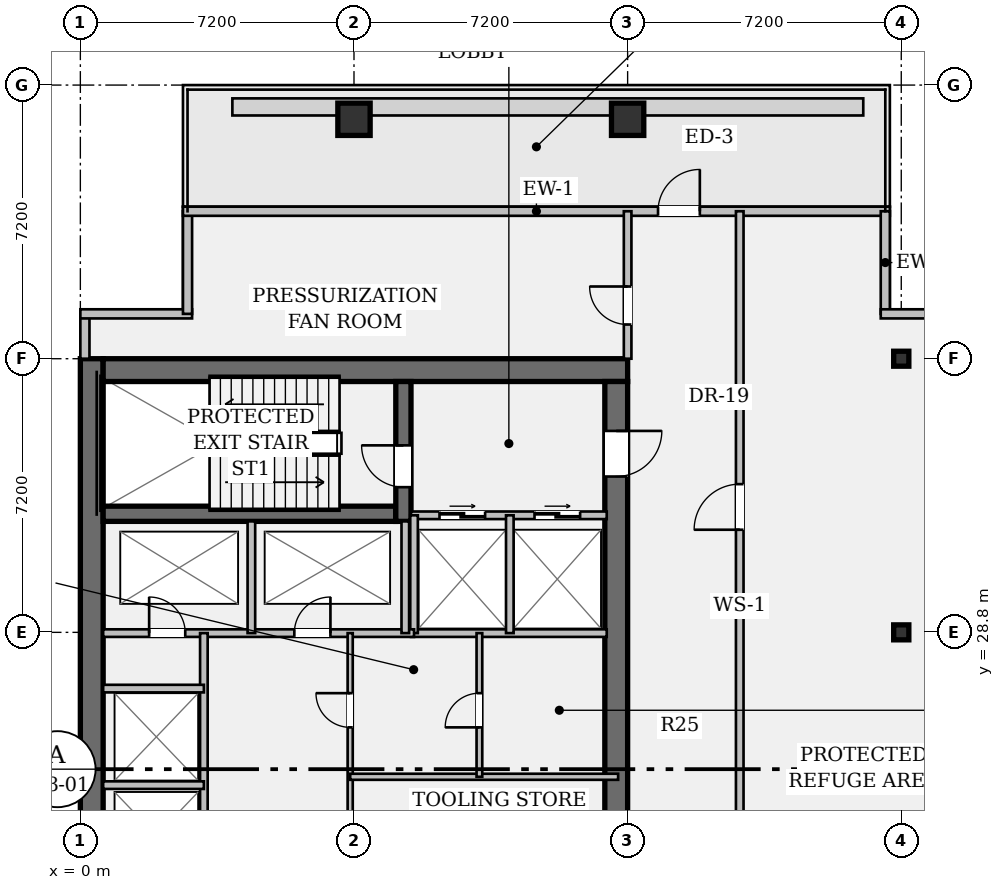
"""IFC4 building model, lengths in metres.
Left out: names, types, materials, properties, quantities, classifications, styles, units other than length and angle.
Written with IfcOpenShell. Run it as: python <this file> out.ifc"""

import sys

from ifc_helpers import new_model, si_unit, direction, frame, frame_2d, origin, origin_2d, place, context, subcontext, project, spatial, rectangle, hollow_rectangle, i_section, extrude, element, fill, save


model = new_model("IFC4")
c1 = context("Model", 3, precision=1e-05, world=origin(), true_north=direction((0.0, 1.0)))
c2 = subcontext(c1, "Body", "Model", "MODEL_VIEW")
j1 = project(units=[si_unit("LENGTHUNIT", "METRE"), si_unit("PLANEANGLEUNIT", "RADIAN")], contexts=[c1])
p1 = place(None, origin())
s1 = spatial("IfcSite", under=j1, at=p1, CompositionType="ELEMENT")
p2 = place(p1, origin())
s2 = spatial("IfcBuilding", under=s1, at=p2, CompositionType="ELEMENT")
p3 = place(p2, frame((0.0, 0.0, 163.8)))
s3 = spatial("IfcBuildingStorey", under=s2, at=p3, CompositionType="ELEMENT", Elevation=163.8)
p4 = place(p3, frame((0.3, 7.2, 0.0), z_axis=(0.0, 0.0, 1.0), x_axis=(0.0, 1.0, 0.0)))
e1 = element("IfcWall", 1, at=p4, inside=s3, PredefinedType="SHEAR", context=c2, shape_type="SweptSolid", body=[
    extrude(rectangle(XDim=28.8, YDim=0.6, at=frame_2d((14.4, 0.0))), origin(), (0.0, 0.0, 1.0), 4.6),
])
p5 = place(p3, frame((0.6, 35.7, 0.0), z_axis=(0.0, 0.0, 1.0), x_axis=(1.0, 0.0, 0.0)))
e2 = element("IfcWall", 2, at=p5, inside=s3, PredefinedType="SHEAR", context=c2, shape_type="SweptSolid", body=[
    extrude(rectangle(XDim=13.8, YDim=0.6, at=frame_2d((6.9, 0.0))), origin(), (0.0, 0.0, 1.0), 4.6),
])
p6 = place(p3, frame((14.1, 35.4, 0.0), z_axis=(0.0, 0.0, 1.0), x_axis=(0.0, -1.0, 0.0)))
e3 = element("IfcWall", 3, at=p6, inside=s3, PredefinedType="SHEAR", context=c2, shape_type="SweptSolid", body=[
    extrude(rectangle(XDim=27.6, YDim=0.6, at=frame_2d((13.8, 0.0))), origin(), (0.0, 0.0, 1.0), 4.6),
])
p7 = place(p6, frame((1.3, 0.0, 0.0)))
e4 = element("IfcOpeningElement", 4, at=p7, cuts=e3, PredefinedType="OPENING", context=c2, shape_type="SweptSolid", body=[
    extrude(rectangle(XDim=1.2, YDim=2.15, at=frame_2d((0.6, 1.075))), frame((0.0, 0.312, 0.0), z_axis=(0.0, -1.0, 0.0), x_axis=(1.0, 0.0, 0.0)), (0.0, 0.0, 1.0), 0.624),
])
p8 = place(p6, frame((25.25, 0.0, 0.0)))
e5 = element("IfcOpeningElement", 5, at=p8, cuts=e3, PredefinedType="OPENING", context=c2, shape_type="SweptSolid", body=[
    extrude(rectangle(XDim=1.2, YDim=2.15, at=frame_2d((0.6, 1.075))), frame((0.0, 0.312, 0.0), z_axis=(0.0, -1.0, 0.0), x_axis=(1.0, 0.0, 0.0)), (0.0, 0.0, 1.0), 0.624),
])
p9 = place(p6, frame((14.6, 0.0, 0.0)))
e6 = element("IfcOpeningElement", 6, at=p9, cuts=e3, PredefinedType="OPENING", context=c2, shape_type="SweptSolid", body=[
    extrude(rectangle(XDim=1.6, YDim=2.2, at=frame_2d((0.8, 1.1))), frame((0.0, 0.312, 0.0), z_axis=(0.0, -1.0, 0.0), x_axis=(1.0, 0.0, 0.0)), (0.0, 0.0, 1.0), 0.624),
])
p10 = place(p3, frame((0.6, 31.92, 0.0), z_axis=(0.0, 0.0, 1.0), x_axis=(1.0, 0.0, 0.0)))
e7 = element("IfcWall", 7, at=p10, inside=s3, PredefinedType="SHEAR", context=c2, shape_type="SweptSolid", body=[
    extrude(rectangle(XDim=7.7, YDim=0.4, at=frame_2d((3.85, 0.0))), origin(), (0.0, 0.0, 1.0), 4.6),
])
p11 = place(p3, frame((8.5, 31.72, 0.0), z_axis=(0.0, 0.0, 1.0), x_axis=(0.0, 1.0, 0.0)))
e8 = element("IfcWall", 8, at=p11, inside=s3, PredefinedType="SHEAR", context=c2, shape_type="SweptSolid", body=[
    extrude(rectangle(XDim=3.68, YDim=0.4, at=frame_2d((1.84, 0.0))), origin(), (0.0, 0.0, 1.0), 4.6),
])
p12 = place(p11, frame((0.9, 0.0, 0.0)))
e9 = element("IfcOpeningElement", 9, at=p12, cuts=e8, PredefinedType="OPENING", context=c2, shape_type="SweptSolid", body=[
    extrude(rectangle(XDim=1.1, YDim=2.15, at=frame_2d((0.55, 1.075))), frame((0.0, 0.212, 0.0), z_axis=(0.0, -1.0, 0.0), x_axis=(1.0, 0.0, 0.0)), (0.0, 0.0, 1.0), 0.424),
])
for number, where, z_axis, x_axis in (
    (10, (7.2, 42.3, 0.0), (0.0, 0.0, 1.0), (1.0, 0.0, 0.0)),
    (11, (14.4, 42.3, 0.0), (0.0, 0.0, 1.0), (1.0, 0.0, 0.0)),
):
    element("IfcColumn", number, at=place(p3, frame(where, z_axis=z_axis, x_axis=x_axis)), inside=s3, PredefinedType="COLUMN", context=c2, shape_type="SweptSolid", body=[
        extrude(hollow_rectangle(XDim=0.85, YDim=0.85, WallThickness=0.05, at=origin_2d()), origin(), (0.0, 0.0, 1.0), 4.6),
    ])
for number, where, z_axis, x_axis in (
    (12, (21.6, 28.8, 0.0), (0.0, 0.0, 1.0), (1.0, 0.0, 0.0)),
    (13, (21.6, 36.0, 0.0), (0.0, 0.0, 1.0), (1.0, 0.0, 0.0)),
):
    element("IfcColumn", number, at=place(p3, frame(where, z_axis=z_axis, x_axis=x_axis)), inside=s3, PredefinedType="COLUMN", context=c2, shape_type="SweptSolid", body=[
        extrude(i_section(OverallWidth=0.399, OverallDepth=0.394, WebThickness=0.023, FlangeThickness=0.037, FilletRadius=0.018, at=origin_2d()), origin(), (0.0, 0.0, 1.0), 4.6),
    ])
p13 = place(p3, frame((0.12, 36.0, 0.0), z_axis=(0.0, 0.0, 1.0), x_axis=(0.0, 1.0, 0.0)))
e14 = element("IfcWall", 14, at=p13, inside=s3, PredefinedType="STANDARD", context=c2, shape_type="SweptSolid", body=[
    extrude(rectangle(XDim=1.18, YDim=0.24, at=frame_2d((0.59, 0.0))), origin(), (0.0, 0.0, 1.0), 4.6),
])
p14 = place(p3, frame((0.0, 37.18, 0.0), z_axis=(0.0, 0.0, 1.0), x_axis=(1.0, 0.0, 0.0)))
e15 = element("IfcWall", 15, at=p14, inside=s3, PredefinedType="STANDARD", context=c2, shape_type="SweptSolid", body=[
    extrude(rectangle(XDim=2.94, YDim=0.24, at=frame_2d((1.47, 0.0))), origin(), (0.0, 0.0, 1.0), 4.6),
])
p15 = place(p3, frame((2.82, 37.18, 0.0), z_axis=(0.0, 0.0, 1.0), x_axis=(0.0, 1.0, 0.0)))
e16 = element("IfcWall", 16, at=p15, inside=s3, PredefinedType="STANDARD", context=c2, shape_type="SweptSolid", body=[
    extrude(rectangle(XDim=2.7, YDim=0.24, at=frame_2d((1.35, 0.0))), origin(), (0.0, 0.0, 1.0), 4.6),
])
p16 = place(p3, frame((2.7, 39.88, 0.0), z_axis=(0.0, 0.0, 1.0), x_axis=(1.0, 0.0, 0.0)))
e17 = element("IfcWall", 17, at=p16, inside=s3, PredefinedType="STANDARD", context=c2, shape_type="SweptSolid", body=[
    extrude(rectangle(XDim=18.6, YDim=0.24, at=frame_2d((9.3, 0.0))), origin(), (0.0, 0.0, 1.0), 3.185),
])
p17 = place(p16, frame((12.5, 0.0, 0.0)))
e18 = element("IfcOpeningElement", 18, at=p17, cuts=e17, PredefinedType="OPENING", context=c2, shape_type="SweptSolid", body=[
    extrude(rectangle(XDim=1.1, YDim=2.15, at=frame_2d((0.55, 1.075))), frame((0.0, 0.132, 0.0), z_axis=(0.0, -1.0, 0.0), x_axis=(1.0, 0.0, 0.0)), (0.0, 0.0, 1.0), 0.264),
])
p18 = place(p3, frame((21.18, 39.88, 0.0), z_axis=(0.0, 0.0, 1.0), x_axis=(0.0, -1.0, 0.0)))
e19 = element("IfcWall", 19, at=p18, inside=s3, PredefinedType="STANDARD", context=c2, shape_type="SweptSolid", body=[
    extrude(rectangle(XDim=2.7, YDim=0.24, at=frame_2d((1.35, 0.0))), origin(), (0.0, 0.0, 1.0), 4.6),
])
p19 = place(p3, frame((21.06, 37.18, 0.0), z_axis=(0.0, 0.0, 1.0), x_axis=(1.0, 0.0, 0.0)))
e20 = element("IfcWall", 20, at=p19, inside=s3, PredefinedType="STANDARD", context=c2, shape_type="SweptSolid", body=[
    extrude(rectangle(XDim=2.94, YDim=0.24, at=frame_2d((1.47, 0.0))), origin(), (0.0, 0.0, 1.0), 4.6),
])
p20 = place(p3, frame((8.7, 31.88, 0.0), z_axis=(0.0, 0.0, 1.0), x_axis=(1.0, 0.0, 0.0)))
e21 = element("IfcWall", 21, at=p20, inside=s3, PredefinedType="PARTITIONING", context=c2, shape_type="SweptSolid", body=[
    extrude(rectangle(XDim=5.15, YDim=0.2, at=frame_2d((2.575, 0.0))), origin(), (0.0, 0.0, 1.0), 4.6),
])
p21 = place(p20, frame((0.75, 0.0, 0.0)))
e22 = element("IfcOpeningElement", 22, at=p21, cuts=e21, PredefinedType="OPENING", context=c2, shape_type="SweptSolid", body=[
    extrude(rectangle(XDim=1.2, YDim=2.2, at=frame_2d((0.6, 1.1))), frame((0.0, 0.112, 0.0), z_axis=(0.0, -1.0, 0.0), x_axis=(1.0, 0.0, 0.0)), (0.0, 0.0, 1.0), 0.224),
])
p22 = place(p20, frame((3.25, 0.0, 0.0)))
e23 = element("IfcOpeningElement", 23, at=p22, cuts=e21, PredefinedType="OPENING", context=c2, shape_type="SweptSolid", body=[
    extrude(rectangle(XDim=1.2, YDim=2.2, at=frame_2d((0.6, 1.1))), frame((0.0, 0.112, 0.0), z_axis=(0.0, -1.0, 0.0), x_axis=(1.0, 0.0, 0.0)), (0.0, 0.0, 1.0), 0.224),
])
p23 = place(p3, frame((8.7, 28.78, 0.0), z_axis=(0.0, 0.0, 1.0), x_axis=(1.0, 0.0, 0.0)))
e24 = element("IfcWall", 24, at=p23, inside=s3, PredefinedType="PARTITIONING", context=c2, shape_type="SweptSolid", body=[
    extrude(rectangle(XDim=5.15, YDim=0.2, at=frame_2d((2.575, 0.0))), origin(), (0.0, 0.0, 1.0), 4.6),
])
for number, where, z_axis, x_axis in (
    (25, (8.78, 28.78, 0.0), (0.0, 0.0, 1.0), (0.0, 1.0, 0.0)),
    (26, (11.3, 28.78, 0.0), (0.0, 0.0, 1.0), (0.0, 1.0, 0.0)),
):
    element("IfcWall", number, at=place(p3, frame(where, z_axis=z_axis, x_axis=x_axis)), inside=s3, PredefinedType="PARTITIONING", context=c2, shape_type="SweptSolid", body=[
        extrude(rectangle(XDim=3.1, YDim=0.2, at=frame_2d((1.55, 0.0))), origin(), (0.0, 0.0, 1.0), 4.6),
    ])
p24 = place(p3, frame((0.6, 28.78, 0.0), z_axis=(0.0, 0.0, 1.0), x_axis=(1.0, 0.0, 0.0)))
e27 = element("IfcWall", 27, at=p24, inside=s3, PredefinedType="PARTITIONING", context=c2, shape_type="SweptSolid", body=[
    extrude(rectangle(XDim=8.18, YDim=0.2, at=frame_2d((4.09, 0.0))), origin(), (0.0, 0.0, 1.0), 4.6),
])
p25 = place(p24, frame((1.21, 0.0, 0.0)))
e28 = element("IfcOpeningElement", 28, at=p25, cuts=e27, PredefinedType="OPENING", context=c2, shape_type="SweptSolid", body=[
    extrude(rectangle(XDim=0.95, YDim=2.15, at=frame_2d((0.475, 1.075))), frame((0.0, 0.112, 0.0), z_axis=(0.0, -1.0, 0.0), x_axis=(1.0, 0.0, 0.0)), (0.0, 0.0, 1.0), 0.224),
])
p26 = place(p24, frame((5.03, 0.0, 0.0)))
e29 = element("IfcOpeningElement", 29, at=p26, cuts=e27, PredefinedType="OPENING", context=c2, shape_type="SweptSolid", body=[
    extrude(rectangle(XDim=0.95, YDim=2.15, at=frame_2d((0.475, 1.075))), frame((0.0, 0.112, 0.0), z_axis=(0.0, -1.0, 0.0), x_axis=(1.0, 0.0, 0.0)), (0.0, 0.0, 1.0), 0.224),
])
for number, where, z_axis, x_axis in (
    (30, (4.5, 28.78, 0.0), (0.0, 0.0, 1.0), (0.0, 1.0, 0.0)),
    (31, (8.55, 28.78, 0.0), (0.0, 0.0, 1.0), (0.0, 1.0, 0.0)),
):
    element("IfcWall", number, at=place(p3, frame(where, z_axis=z_axis, x_axis=x_axis)), inside=s3, PredefinedType="PARTITIONING", context=c2, shape_type="SweptSolid", body=[
        extrude(rectangle(XDim=2.94, YDim=0.2, at=frame_2d((1.47, 0.0))), origin(), (0.0, 0.0, 1.0), 4.6),
    ])
p27 = place(p3, frame((3.25, 15.7, 0.0), z_axis=(0.0, 0.0, 1.0), x_axis=(0.0, 1.0, 0.0)))
e32 = element("IfcWall", 32, at=p27, inside=s3, PredefinedType="PARTITIONING", context=c2, shape_type="SweptSolid", body=[
    extrude(rectangle(XDim=13.08, YDim=0.2, at=frame_2d((6.54, 0.0))), origin(), (0.0, 0.0, 1.0), 4.6),
])
for number, where, z_axis, x_axis in (
    (33, (0.6, 24.78, 0.0), (0.0, 0.0, 1.0), (1.0, 0.0, 0.0)),
    (34, (0.6, 27.32, 0.0), (0.0, 0.0, 1.0), (1.0, 0.0, 0.0)),
):
    element("IfcWall", number, at=place(p3, frame(where, z_axis=z_axis, x_axis=x_axis)), inside=s3, PredefinedType="PARTITIONING", context=c2, shape_type="SweptSolid", body=[
        extrude(rectangle(XDim=2.65, YDim=0.2, at=frame_2d((1.325, 0.0))), origin(), (0.0, 0.0, 1.0), 4.6),
    ])
p28 = place(p3, frame((7.1, 22.2, 0.0), z_axis=(0.0, 0.0, 1.0), x_axis=(0.0, 1.0, 0.0)))
e35 = element("IfcWall", 35, at=p28, inside=s3, PredefinedType="PARTITIONING", context=c2, shape_type="SweptSolid", body=[
    extrude(rectangle(XDim=6.58, YDim=0.135, at=frame_2d((3.29, 0.0))), origin(), (0.0, 0.0, 1.0), 4.6),
])
p29 = place(p28, frame((4.1, 0.0, 0.0)))
e36 = element("IfcOpeningElement", 36, at=p29, cuts=e35, PredefinedType="OPENING", context=c2, shape_type="SweptSolid", body=[
    extrude(rectangle(XDim=0.9, YDim=2.15, at=frame_2d((0.45, 1.075))), frame((0.0, 0.08, 0.0), z_axis=(0.0, -1.0, 0.0), x_axis=(1.0, 0.0, 0.0)), (0.0, 0.0, 1.0), 0.159),
])
p30 = place(p3, frame((7.1, 25.0, 0.0), z_axis=(0.0, 0.0, 1.0), x_axis=(1.0, 0.0, 0.0)))
e37 = element("IfcWall", 37, at=p30, inside=s3, PredefinedType="PARTITIONING", context=c2, shape_type="SweptSolid", body=[
    extrude(rectangle(XDim=7.05, YDim=0.16, at=frame_2d((3.525, 0.0))), origin(), (0.0, 0.0, 1.0), 4.6),
])
p31 = place(p3, frame((10.5, 25.0, 0.0), z_axis=(0.0, 0.0, 1.0), x_axis=(0.0, 1.0, 0.0)))
e38 = element("IfcWall", 38, at=p31, inside=s3, PredefinedType="PARTITIONING", context=c2, shape_type="SweptSolid", body=[
    extrude(rectangle(XDim=3.78, YDim=0.15, at=frame_2d((1.89, 0.0))), origin(), (0.0, 0.0, 1.0), 4.6),
])
p32 = place(p31, frame((1.3, 0.0, 0.0)))
e39 = element("IfcOpeningElement", 39, at=p32, cuts=e38, PredefinedType="OPENING", context=c2, shape_type="SweptSolid", body=[
    extrude(rectangle(XDim=0.9, YDim=2.15, at=frame_2d((0.45, 1.075))), frame((0.0, 0.087, 0.0), z_axis=(0.0, -1.0, 0.0), x_axis=(1.0, 0.0, 0.0)), (0.0, 0.0, 1.0), 0.174),
])
p33 = place(p3, frame((14.4, 36.0, 0.0), z_axis=(0.0, 0.0, 1.0), x_axis=(0.0, 1.0, 0.0)))
e40 = element("IfcWall", 40, at=p33, inside=s3, PredefinedType="PARTITIONING", context=c2, shape_type="SweptSolid", body=[
    extrude(rectangle(XDim=3.88, YDim=0.2, at=frame_2d((1.94, 0.0))), origin(), (0.0, 0.0, 1.0), 3.467),
])
p34 = place(p33, frame((0.9, 0.0, 0.0)))
e41 = element("IfcOpeningElement", 41, at=p34, cuts=e40, PredefinedType="OPENING", context=c2, shape_type="SweptSolid", body=[
    extrude(rectangle(XDim=1.0, YDim=2.15, at=frame_2d((0.5, 1.075))), frame((0.0, 0.112, 0.0), z_axis=(0.0, -1.0, 0.0), x_axis=(1.0, 0.0, 0.0)), (0.0, 0.0, 1.0), 0.224),
])
p35 = place(p3, frame((17.35, 20.3, 0.0), z_axis=(0.0, 0.0, 1.0), x_axis=(0.0, 1.0, 0.0)))
e42 = element("IfcWall", 42, at=p35, inside=s3, PredefinedType="PARTITIONING", context=c2, shape_type="SweptSolid", body=[
    extrude(rectangle(XDim=19.58, YDim=0.2, at=frame_2d((9.79, 0.0))), origin(), (0.0, 0.0, 1.0), 3.963),
])
p36 = place(p35, frame((11.2, 0.0, 0.0)))
e43 = element("IfcOpeningElement", 43, at=p36, cuts=e42, PredefinedType="OPENING", context=c2, shape_type="SweptSolid", body=[
    extrude(rectangle(XDim=1.2, YDim=2.15, at=frame_2d((0.6, 1.075))), frame((0.0, 0.112, 0.0), z_axis=(0.0, -1.0, 0.0), x_axis=(1.0, 0.0, 0.0)), (0.0, 0.0, 1.0), 0.224),
])
p37 = place(p17, origin())
e44 = element("IfcDoor", 44, at=p37, inside=s3, OperationType="SINGLE_SWING_RIGHT", PredefinedType="DOOR", context=c2, shape_type="SweptSolid", body=[
    extrude(rectangle(XDim=1.1, YDim=2.15, at=frame_2d((0.55, 1.075))), frame((0.0, 0.025, 0.0), z_axis=(0.0, -1.0, 0.0), x_axis=(1.0, 0.0, 0.0)), (0.0, 0.0, 1.0), 0.05),
])
fill(e18, e44)
p38 = place(p12, origin())
e45 = element("IfcDoor", 45, at=p38, inside=s3, OperationType="SINGLE_SWING_RIGHT", PredefinedType="DOOR", context=c2, shape_type="SweptSolid", body=[
    extrude(rectangle(XDim=1.1, YDim=2.15, at=frame_2d((0.55, 1.075))), frame((0.0, 0.025, 0.0), z_axis=(0.0, -1.0, 0.0), x_axis=(1.0, 0.0, 0.0)), (0.0, 0.0, 1.0), 0.05),
])
fill(e9, e45)
p39 = place(p7, origin())
e46 = element("IfcDoor", 46, at=p39, inside=s3, OperationType="SINGLE_SWING_LEFT", PredefinedType="DOOR", context=c2, shape_type="SweptSolid", body=[
    extrude(rectangle(XDim=1.2, YDim=2.15, at=frame_2d((0.6, 1.075))), frame((0.0, 0.025, 0.0), z_axis=(0.0, -1.0, 0.0), x_axis=(1.0, 0.0, 0.0)), (0.0, 0.0, 1.0), 0.05),
])
fill(e4, e46)
p40 = place(p21, origin())
e47 = element("IfcDoor", 47, at=p40, inside=s3, OperationType="DOUBLE_DOOR_SLIDING", PredefinedType="DOOR", context=c2, shape_type="SweptSolid", body=[
    extrude(rectangle(XDim=1.2, YDim=2.2, at=frame_2d((0.6, 1.1))), frame((0.0, 0.025, 0.0), z_axis=(0.0, -1.0, 0.0), x_axis=(1.0, 0.0, 0.0)), (0.0, 0.0, 1.0), 0.05),
])
fill(e22, e47)
p41 = place(p22, origin())
e48 = element("IfcDoor", 48, at=p41, inside=s3, OperationType="DOUBLE_DOOR_SLIDING", PredefinedType="DOOR", context=c2, shape_type="SweptSolid", body=[
    extrude(rectangle(XDim=1.2, YDim=2.2, at=frame_2d((0.6, 1.1))), frame((0.0, 0.025, 0.0), z_axis=(0.0, -1.0, 0.0), x_axis=(1.0, 0.0, 0.0)), (0.0, 0.0, 1.0), 0.05),
])
fill(e23, e48)
p42 = place(p25, origin())
e49 = element("IfcDoor", 49, at=p42, inside=s3, OperationType="SINGLE_SWING_LEFT", PredefinedType="DOOR", context=c2, shape_type="SweptSolid", body=[
    extrude(rectangle(XDim=0.95, YDim=2.15, at=frame_2d((0.475, 1.075))), frame((0.0, 0.025, 0.0), z_axis=(0.0, -1.0, 0.0), x_axis=(1.0, 0.0, 0.0)), (0.0, 0.0, 1.0), 0.05),
])
fill(e28, e49)
p43 = place(p26, origin())
e50 = element("IfcDoor", 50, at=p43, inside=s3, OperationType="SINGLE_SWING_RIGHT", PredefinedType="DOOR", context=c2, shape_type="SweptSolid", body=[
    extrude(rectangle(XDim=0.95, YDim=2.15, at=frame_2d((0.475, 1.075))), frame((0.0, 0.025, 0.0), z_axis=(0.0, -1.0, 0.0), x_axis=(1.0, 0.0, 0.0)), (0.0, 0.0, 1.0), 0.05),
])
fill(e29, e50)
p44 = place(p29, origin())
e51 = element("IfcDoor", 51, at=p44, inside=s3, OperationType="SINGLE_SWING_RIGHT", PredefinedType="DOOR", context=c2, shape_type="SweptSolid", body=[
    extrude(rectangle(XDim=0.9, YDim=2.15, at=frame_2d((0.45, 1.075))), frame((0.0, 0.025, 0.0), z_axis=(0.0, -1.0, 0.0), x_axis=(1.0, 0.0, 0.0)), (0.0, 0.0, 1.0), 0.05),
])
fill(e36, e51)
p45 = place(p32, origin())
e52 = element("IfcDoor", 52, at=p45, inside=s3, OperationType="SINGLE_SWING_LEFT", PredefinedType="DOOR", context=c2, shape_type="SweptSolid", body=[
    extrude(rectangle(XDim=0.9, YDim=2.15, at=frame_2d((0.45, 1.075))), frame((0.0, 0.025, 0.0), z_axis=(0.0, -1.0, 0.0), x_axis=(1.0, 0.0, 0.0)), (0.0, 0.0, 1.0), 0.05),
])
fill(e39, e52)
p46 = place(p36, origin())
e53 = element("IfcDoor", 53, at=p46, inside=s3, OperationType="SINGLE_SWING_LEFT", PredefinedType="DOOR", context=c2, shape_type="SweptSolid", body=[
    extrude(rectangle(XDim=1.2, YDim=2.15, at=frame_2d((0.6, 1.075))), frame((0.0, 0.025, 0.0), z_axis=(0.0, -1.0, 0.0), x_axis=(1.0, 0.0, 0.0)), (0.0, 0.0, 1.0), 0.05),
])
fill(e43, e53)
p47 = place(p34, origin())
e54 = element("IfcDoor", 54, at=p47, inside=s3, OperationType="SINGLE_SWING_RIGHT", PredefinedType="DOOR", context=c2, shape_type="SweptSolid", body=[
    extrude(rectangle(XDim=1.0, YDim=2.15, at=frame_2d((0.5, 1.075))), frame((0.0, 0.025, 0.0), z_axis=(0.0, -1.0, 0.0), x_axis=(1.0, 0.0, 0.0)), (0.0, 0.0, 1.0), 0.05),
])
fill(e41, e54)
save(model, sys.argv[1])
